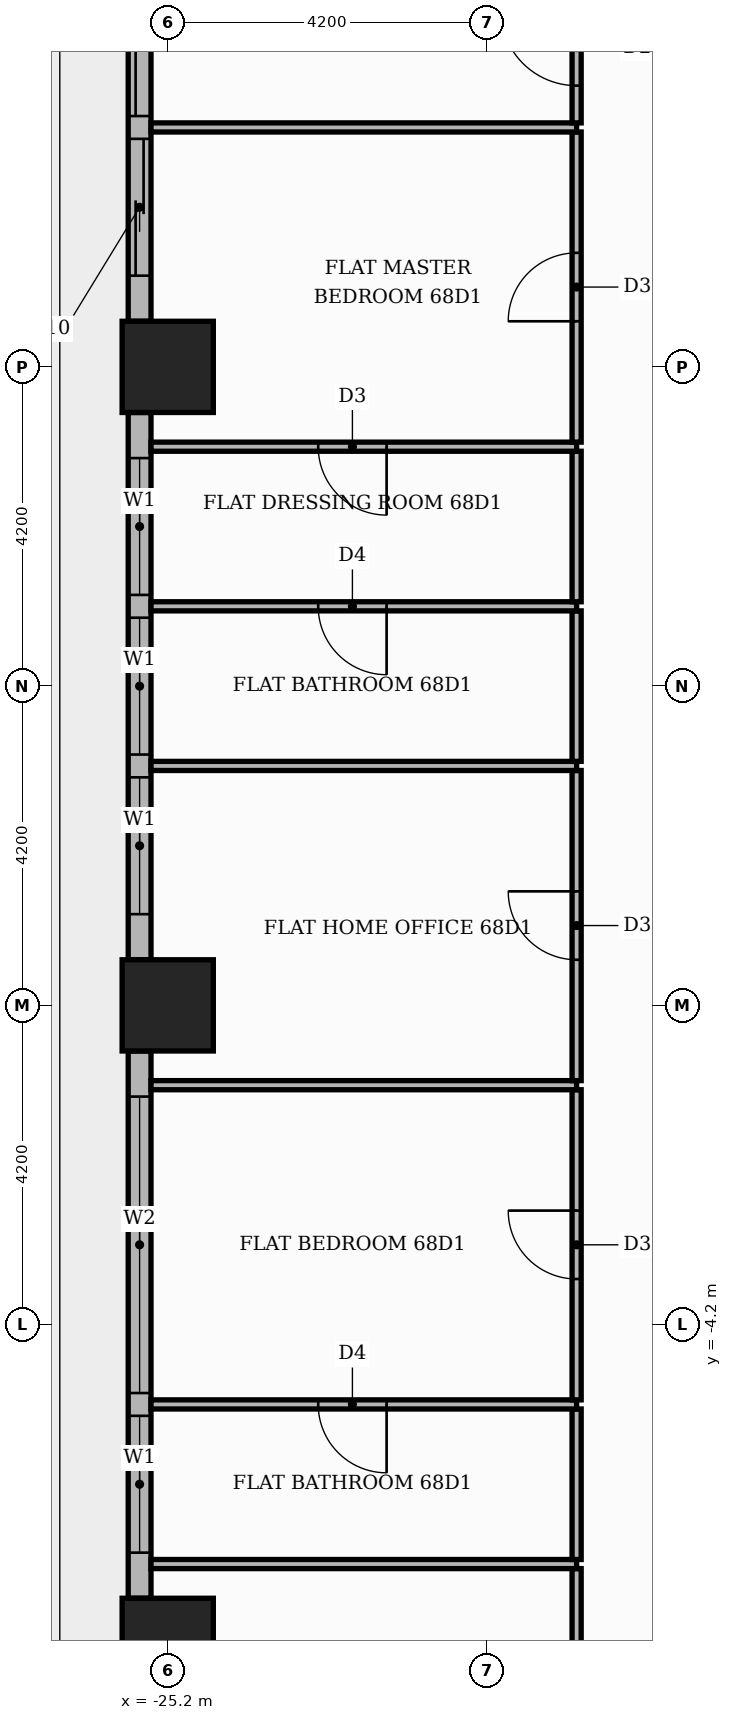
"""IFC4 building model, lengths in metres.
Left out: names, types, materials, properties, quantities, classifications, styles, units other than length and angle.
Written with IfcOpenShell. Run it as: python <this file> out.ifc"""

import sys

from ifc_helpers import new_model, si_unit, direction, frame, frame_2d, origin, origin_2d, place, context, subcontext, project, spatial, rectangle, extrude, element, fill, save


model = new_model("IFC4")
c1 = context("Model", 3, precision=1e-05, world=origin(), true_north=direction((0.0, 1.0)))
c2 = subcontext(c1, "Body", "Model", "MODEL_VIEW")
j1 = project(units=[si_unit("LENGTHUNIT", "METRE"), si_unit("PLANEANGLEUNIT", "RADIAN")], contexts=[c1])
p1 = place(None, origin())
s1 = spatial("IfcSite", under=j1, at=p1, CompositionType="ELEMENT")
p2 = place(p1, origin())
s2 = spatial("IfcBuilding", under=s1, at=p2, CompositionType="ELEMENT")
p3 = place(p2, frame((0.0, 0.0, 283.5)))
s3 = spatial("IfcBuildingStorey", under=s2, at=p3, CompositionType="ELEMENT", Elevation=283.5)
for number, where, z_axis, x_axis in (
    (1, (-25.2, 0.0, 0.0), (0.0, 0.0, 1.0), (1.0, 0.0, 0.0)),
    (2, (-25.2, -8.4, 0.0), (0.0, 0.0, 1.0), (1.0, 0.0, 0.0)),
    (3, (-25.2, 8.4, 0.0), (0.0, 0.0, 1.0), (1.0, 0.0, 0.0)),
):
    element("IfcColumn", number, at=place(p3, frame(where, z_axis=z_axis, x_axis=x_axis)), inside=s3, PredefinedType="COLUMN", context=c2, shape_type="SweptSolid", body=[
        extrude(rectangle(XDim=1.2, YDim=1.2, at=origin_2d()), origin(), (0.0, 0.0, 1.0), 3.9),
    ])
p4 = place(p3, frame((-25.57, 16.2, 0.0), z_axis=(0.0, 0.0, 1.0), x_axis=(0.0, -1.0, 0.0)))
e4 = element("IfcWall", 4, at=p4, inside=s3, PredefinedType="STANDARD", context=c2, shape_type="SweptSolid", body=[
    extrude(rectangle(XDim=7.2, YDim=0.3, at=frame_2d((3.6, 0.0))), origin(), (0.0, 0.0, 1.0), 3.4),
])
p5 = place(p4, frame((0.6, 0.0, 0.0)))
e5 = element("IfcOpeningElement", 5, at=p5, cuts=e4, PredefinedType="OPENING", context=c2, shape_type="SweptSolid", body=[
    extrude(rectangle(XDim=3.9, YDim=2.4, at=frame_2d((1.95, 1.2))), frame((0.0, 0.16, 0.0), z_axis=(0.0, -1.0, 0.0), x_axis=(1.0, 0.0, 0.0)), (0.0, 0.0, 1.0), 0.32),
])
p6 = place(p4, frame((4.8, 0.0, 0.0)))
e6 = element("IfcOpeningElement", 6, at=p6, cuts=e4, PredefinedType="OPENING", context=c2, shape_type="SweptSolid", body=[
    extrude(rectangle(XDim=1.8, YDim=2.4, at=frame_2d((0.9, 1.2))), frame((0.0, 0.16, 0.0), z_axis=(0.0, -1.0, 0.0), x_axis=(1.0, 0.0, 0.0)), (0.0, 0.0, 1.0), 0.32),
])
p7 = place(p3, frame((-25.57, 7.8, 0.0), z_axis=(0.0, 0.0, 1.0), x_axis=(0.0, -1.0, 0.0)))
e7 = element("IfcWall", 7, at=p7, inside=s3, PredefinedType="STANDARD", context=c2, shape_type="SweptSolid", body=[
    extrude(rectangle(XDim=7.2, YDim=0.3, at=frame_2d((3.6, 0.0))), origin(), (0.0, 0.0, 1.0), 3.4),
])
p8 = place(p7, frame((0.6, 0.0, 0.9)))
e8 = element("IfcOpeningElement", 8, at=p8, cuts=e7, PredefinedType="OPENING", context=c2, shape_type="SweptSolid", body=[
    extrude(rectangle(XDim=1.8, YDim=2.1, at=frame_2d((0.9, 1.05))), frame((0.0, 0.16, 0.0), z_axis=(0.0, -1.0, 0.0), x_axis=(1.0, 0.0, 0.0)), (0.0, 0.0, 1.0), 0.32),
])
p9 = place(p7, frame((2.7, 0.0, 0.9)))
e9 = element("IfcOpeningElement", 9, at=p9, cuts=e7, PredefinedType="OPENING", context=c2, shape_type="SweptSolid", body=[
    extrude(rectangle(XDim=1.8, YDim=2.1, at=frame_2d((0.9, 1.05))), frame((0.0, 0.16, 0.0), z_axis=(0.0, -1.0, 0.0), x_axis=(1.0, 0.0, 0.0)), (0.0, 0.0, 1.0), 0.32),
])
p10 = place(p7, frame((4.8, 0.0, 0.9)))
e10 = element("IfcOpeningElement", 10, at=p10, cuts=e7, PredefinedType="OPENING", context=c2, shape_type="SweptSolid", body=[
    extrude(rectangle(XDim=1.8, YDim=2.1, at=frame_2d((0.9, 1.05))), frame((0.0, 0.16, 0.0), z_axis=(0.0, -1.0, 0.0), x_axis=(1.0, 0.0, 0.0)), (0.0, 0.0, 1.0), 0.32),
])
p11 = place(p3, frame((-25.57, -0.6, 0.0), z_axis=(0.0, 0.0, 1.0), x_axis=(0.0, -1.0, 0.0)))
e11 = element("IfcWall", 11, at=p11, inside=s3, PredefinedType="STANDARD", context=c2, shape_type="SweptSolid", body=[
    extrude(rectangle(XDim=7.2, YDim=0.3, at=frame_2d((3.6, 0.0))), origin(), (0.0, 0.0, 1.0), 3.4),
])
p12 = place(p11, frame((0.6, 0.0, 0.9)))
e12 = element("IfcOpeningElement", 12, at=p12, cuts=e11, PredefinedType="OPENING", context=c2, shape_type="SweptSolid", body=[
    extrude(rectangle(XDim=3.9, YDim=2.1, at=frame_2d((1.95, 1.05))), frame((0.0, 0.16, 0.0), z_axis=(0.0, -1.0, 0.0), x_axis=(1.0, 0.0, 0.0)), (0.0, 0.0, 1.0), 0.32),
])
p13 = place(p11, frame((4.8, 0.0, 0.9)))
e13 = element("IfcOpeningElement", 13, at=p13, cuts=e11, PredefinedType="OPENING", context=c2, shape_type="SweptSolid", body=[
    extrude(rectangle(XDim=1.8, YDim=2.1, at=frame_2d((0.9, 1.05))), frame((0.0, 0.16, 0.0), z_axis=(0.0, -1.0, 0.0), x_axis=(1.0, 0.0, 0.0)), (0.0, 0.0, 1.0), 0.32),
])
p14 = place(p3, frame((-19.82, -11.49, 0.0), z_axis=(0.0, 0.0, 1.0), x_axis=(0.0, 1.0, 0.0)))
e14 = element("IfcWall", 14, at=p14, inside=s3, PredefinedType="PARTITIONING", context=c2, shape_type="SweptSolid", body=[
    extrude(rectangle(XDim=4.08, YDim=0.12, at=frame_2d((2.04, 0.0))), origin(), (0.0, 0.0, 1.0), 3.4),
])
p15 = place(p14, frame((1.59, 0.0, 0.0)))
e15 = element("IfcOpeningElement", 15, at=p15, cuts=e14, PredefinedType="OPENING", context=c2, shape_type="SweptSolid", body=[
    extrude(rectangle(XDim=0.9, YDim=2.1, at=frame_2d((0.45, 1.05))), frame((0.0, 0.07, 0.0), z_axis=(0.0, -1.0, 0.0), x_axis=(1.0, 0.0, 0.0)), (0.0, 0.0, 1.0), 0.14),
])
p16 = place(p3, frame((-25.42, -7.35, 0.0), z_axis=(0.0, 0.0, 1.0), x_axis=(1.0, 0.0, 0.0)))
e16 = element("IfcWall", 16, at=p16, inside=s3, PredefinedType="PARTITIONING", context=c2, shape_type="SweptSolid", body=[
    extrude(rectangle(XDim=5.6, YDim=0.12, at=frame_2d((2.8, 0.0))), origin(), (0.0, 0.0, 1.0), 3.4),
])
p17 = place(p3, frame((-19.82, -7.29, 0.0), z_axis=(0.0, 0.0, 1.0), x_axis=(0.0, 1.0, 0.0)))
e17 = element("IfcWall", 17, at=p17, inside=s3, PredefinedType="PARTITIONING", context=c2, shape_type="SweptSolid", body=[
    extrude(rectangle(XDim=1.98, YDim=0.12, at=frame_2d((0.99, 0.0))), origin(), (0.0, 0.0, 1.0), 3.4),
])
p18 = place(p3, frame((-25.42, -5.25, 0.0), z_axis=(0.0, 0.0, 1.0), x_axis=(1.0, 0.0, 0.0)))
e18 = element("IfcWall", 18, at=p18, inside=s3, PredefinedType="PARTITIONING", context=c2, shape_type="SweptSolid", body=[
    extrude(rectangle(XDim=5.6, YDim=0.12, at=frame_2d((2.8, 0.0))), origin(), (0.0, 0.0, 1.0), 3.4),
])
p19 = place(p18, frame((2.2, 0.0, 0.0)))
e19 = element("IfcOpeningElement", 19, at=p19, cuts=e18, PredefinedType="OPENING", context=c2, shape_type="SweptSolid", body=[
    extrude(rectangle(XDim=0.9, YDim=2.1, at=frame_2d((0.45, 1.05))), frame((0.0, 0.07, 0.0), z_axis=(0.0, -1.0, 0.0), x_axis=(1.0, 0.0, 0.0)), (0.0, 0.0, 1.0), 0.14),
])
p20 = place(p3, frame((-19.82, -5.19, 0.0), z_axis=(0.0, 0.0, 1.0), x_axis=(0.0, 1.0, 0.0)))
e20 = element("IfcWall", 20, at=p20, inside=s3, PredefinedType="PARTITIONING", context=c2, shape_type="SweptSolid", body=[
    extrude(rectangle(XDim=4.08, YDim=0.12, at=frame_2d((2.04, 0.0))), origin(), (0.0, 0.0, 1.0), 3.4),
])
p21 = place(p20, frame((1.59, 0.0, 0.0)))
e21 = element("IfcOpeningElement", 21, at=p21, cuts=e20, PredefinedType="OPENING", context=c2, shape_type="SweptSolid", body=[
    extrude(rectangle(XDim=0.9, YDim=2.1, at=frame_2d((0.45, 1.05))), frame((0.0, 0.07, 0.0), z_axis=(0.0, -1.0, 0.0), x_axis=(1.0, 0.0, 0.0)), (0.0, 0.0, 1.0), 0.14),
])
p22 = place(p3, frame((-25.42, -1.05, 0.0), z_axis=(0.0, 0.0, 1.0), x_axis=(1.0, 0.0, 0.0)))
e22 = element("IfcWall", 22, at=p22, inside=s3, PredefinedType="PARTITIONING", context=c2, shape_type="SweptSolid", body=[
    extrude(rectangle(XDim=5.6, YDim=0.12, at=frame_2d((2.8, 0.0))), origin(), (0.0, 0.0, 1.0), 3.4),
])
p23 = place(p3, frame((-19.82, -0.99, 0.0), z_axis=(0.0, 0.0, 1.0), x_axis=(0.0, 1.0, 0.0)))
e23 = element("IfcWall", 23, at=p23, inside=s3, PredefinedType="PARTITIONING", context=c2, shape_type="SweptSolid", body=[
    extrude(rectangle(XDim=4.08, YDim=0.12, at=frame_2d((2.04, 0.0))), origin(), (0.0, 0.0, 1.0), 3.4),
])
p24 = place(p23, frame((1.59, 0.0, 0.0)))
e24 = element("IfcOpeningElement", 24, at=p24, cuts=e23, PredefinedType="OPENING", context=c2, shape_type="SweptSolid", body=[
    extrude(rectangle(XDim=0.9, YDim=2.1, at=frame_2d((0.45, 1.05))), frame((0.0, 0.07, 0.0), z_axis=(0.0, -1.0, 0.0), x_axis=(1.0, 0.0, 0.0)), (0.0, 0.0, 1.0), 0.14),
])
p25 = place(p3, frame((-25.42, 3.15, 0.0), z_axis=(0.0, 0.0, 1.0), x_axis=(1.0, 0.0, 0.0)))
e25 = element("IfcWall", 25, at=p25, inside=s3, PredefinedType="PARTITIONING", context=c2, shape_type="SweptSolid", body=[
    extrude(rectangle(XDim=5.6, YDim=0.12, at=frame_2d((2.8, 0.0))), origin(), (0.0, 0.0, 1.0), 3.4),
])
p26 = place(p3, frame((-19.82, 3.21, 0.0), z_axis=(0.0, 0.0, 1.0), x_axis=(0.0, 1.0, 0.0)))
e26 = element("IfcWall", 26, at=p26, inside=s3, PredefinedType="PARTITIONING", context=c2, shape_type="SweptSolid", body=[
    extrude(rectangle(XDim=1.98, YDim=0.12, at=frame_2d((0.99, 0.0))), origin(), (0.0, 0.0, 1.0), 3.4),
])
p27 = place(p3, frame((-25.42, 5.25, 0.0), z_axis=(0.0, 0.0, 1.0), x_axis=(1.0, 0.0, 0.0)))
e27 = element("IfcWall", 27, at=p27, inside=s3, PredefinedType="PARTITIONING", context=c2, shape_type="SweptSolid", body=[
    extrude(rectangle(XDim=5.6, YDim=0.12, at=frame_2d((2.8, 0.0))), origin(), (0.0, 0.0, 1.0), 3.4),
])
p28 = place(p27, frame((2.2, 0.0, 0.0)))
e28 = element("IfcOpeningElement", 28, at=p28, cuts=e27, PredefinedType="OPENING", context=c2, shape_type="SweptSolid", body=[
    extrude(rectangle(XDim=0.9, YDim=2.1, at=frame_2d((0.45, 1.05))), frame((0.0, 0.07, 0.0), z_axis=(0.0, -1.0, 0.0), x_axis=(1.0, 0.0, 0.0)), (0.0, 0.0, 1.0), 0.14),
])
p29 = place(p3, frame((-19.82, 5.31, 0.0), z_axis=(0.0, 0.0, 1.0), x_axis=(0.0, 1.0, 0.0)))
e29 = element("IfcWall", 29, at=p29, inside=s3, PredefinedType="PARTITIONING", context=c2, shape_type="SweptSolid", body=[
    extrude(rectangle(XDim=1.98, YDim=0.12, at=frame_2d((0.99, 0.0))), origin(), (0.0, 0.0, 1.0), 3.4),
])
p30 = place(p3, frame((-25.42, 7.35, 0.0), z_axis=(0.0, 0.0, 1.0), x_axis=(1.0, 0.0, 0.0)))
e30 = element("IfcWall", 30, at=p30, inside=s3, PredefinedType="PARTITIONING", context=c2, shape_type="SweptSolid", body=[
    extrude(rectangle(XDim=5.6, YDim=0.12, at=frame_2d((2.8, 0.0))), origin(), (0.0, 0.0, 1.0), 3.4),
])
p31 = place(p30, frame((2.2, 0.0, 0.0)))
e31 = element("IfcOpeningElement", 31, at=p31, cuts=e30, PredefinedType="OPENING", context=c2, shape_type="SweptSolid", body=[
    extrude(rectangle(XDim=0.9, YDim=2.1, at=frame_2d((0.45, 1.05))), frame((0.0, 0.07, 0.0), z_axis=(0.0, -1.0, 0.0), x_axis=(1.0, 0.0, 0.0)), (0.0, 0.0, 1.0), 0.14),
])
p32 = place(p3, frame((-19.82, 7.41, 0.0), z_axis=(0.0, 0.0, 1.0), x_axis=(0.0, 1.0, 0.0)))
e32 = element("IfcWall", 32, at=p32, inside=s3, PredefinedType="PARTITIONING", context=c2, shape_type="SweptSolid", body=[
    extrude(rectangle(XDim=4.08, YDim=0.12, at=frame_2d((2.04, 0.0))), origin(), (0.0, 0.0, 1.0), 3.4),
])
p33 = place(p32, frame((1.59, 0.0, 0.0)))
e33 = element("IfcOpeningElement", 33, at=p33, cuts=e32, PredefinedType="OPENING", context=c2, shape_type="SweptSolid", body=[
    extrude(rectangle(XDim=0.9, YDim=2.1, at=frame_2d((0.45, 1.05))), frame((0.0, 0.07, 0.0), z_axis=(0.0, -1.0, 0.0), x_axis=(1.0, 0.0, 0.0)), (0.0, 0.0, 1.0), 0.14),
])
p34 = place(p3, frame((-25.42, 11.55, 0.0), z_axis=(0.0, 0.0, 1.0), x_axis=(1.0, 0.0, 0.0)))
e34 = element("IfcWall", 34, at=p34, inside=s3, PredefinedType="PARTITIONING", context=c2, shape_type="SweptSolid", body=[
    extrude(rectangle(XDim=5.6, YDim=0.12, at=frame_2d((2.8, 0.0))), origin(), (0.0, 0.0, 1.0), 3.4),
])
p35 = place(p3, frame((-19.82, 11.61, 0.0), z_axis=(0.0, 0.0, 1.0), x_axis=(0.0, 1.0, 0.0)))
e35 = element("IfcWall", 35, at=p35, inside=s3, PredefinedType="PARTITIONING", context=c2, shape_type="SweptSolid", body=[
    extrude(rectangle(XDim=1.98, YDim=0.12, at=frame_2d((0.99, 0.0))), origin(), (0.0, 0.0, 1.0), 3.4),
])
p36 = place(p35, frame((0.49, 0.0, 0.0)))
e36 = element("IfcOpeningElement", 36, at=p36, cuts=e35, PredefinedType="OPENING", context=c2, shape_type="SweptSolid", body=[
    extrude(rectangle(XDim=1.0, YDim=2.1, at=frame_2d((0.5, 1.05))), frame((0.0, 0.07, 0.0), z_axis=(0.0, -1.0, 0.0), x_axis=(1.0, 0.0, 0.0)), (0.0, 0.0, 1.0), 0.14),
])
p37 = place(p5, origin())
e37 = element("IfcDoor", 37, at=p37, inside=s3, OperationType="SLIDING_TO_LEFT", PredefinedType="DOOR", context=c2, shape_type="SweptSolid", body=[
    extrude(rectangle(XDim=3.9, YDim=2.4, at=frame_2d((1.95, 1.2))), frame((0.0, 0.025, 0.0), z_axis=(0.0, -1.0, 0.0), x_axis=(1.0, 0.0, 0.0)), (0.0, 0.0, 1.0), 0.05),
])
fill(e5, e37)
p38 = place(p6, origin())
e38 = element("IfcDoor", 38, at=p38, inside=s3, OperationType="SLIDING_TO_RIGHT", PredefinedType="DOOR", context=c2, shape_type="SweptSolid", body=[
    extrude(rectangle(XDim=1.8, YDim=2.4, at=frame_2d((0.9, 1.2))), frame((0.0, 0.025, 0.0), z_axis=(0.0, -1.0, 0.0), x_axis=(1.0, 0.0, 0.0)), (0.0, 0.0, 1.0), 0.05),
])
fill(e6, e38)
p39 = place(p8, origin())
e39 = element("IfcWindow", 39, at=p39, inside=s3, PartitioningType="SINGLE_PANEL", PredefinedType="WINDOW", context=c2, shape_type="SweptSolid", body=[
    extrude(rectangle(XDim=1.8, YDim=2.1, at=frame_2d((0.9, 1.05))), frame((0.0, 0.03, 0.0), z_axis=(0.0, -1.0, 0.0), x_axis=(1.0, 0.0, 0.0)), (0.0, 0.0, 1.0), 0.06),
])
fill(e8, e39)
p40 = place(p9, origin())
e40 = element("IfcWindow", 40, at=p40, inside=s3, PartitioningType="SINGLE_PANEL", PredefinedType="WINDOW", context=c2, shape_type="SweptSolid", body=[
    extrude(rectangle(XDim=1.8, YDim=2.1, at=frame_2d((0.9, 1.05))), frame((0.0, 0.03, 0.0), z_axis=(0.0, -1.0, 0.0), x_axis=(1.0, 0.0, 0.0)), (0.0, 0.0, 1.0), 0.06),
])
fill(e9, e40)
p41 = place(p10, origin())
e41 = element("IfcWindow", 41, at=p41, inside=s3, PartitioningType="SINGLE_PANEL", PredefinedType="WINDOW", context=c2, shape_type="SweptSolid", body=[
    extrude(rectangle(XDim=1.8, YDim=2.1, at=frame_2d((0.9, 1.05))), frame((0.0, 0.03, 0.0), z_axis=(0.0, -1.0, 0.0), x_axis=(1.0, 0.0, 0.0)), (0.0, 0.0, 1.0), 0.06),
])
fill(e10, e41)
p42 = place(p12, origin())
e42 = element("IfcWindow", 42, at=p42, inside=s3, PartitioningType="SINGLE_PANEL", PredefinedType="WINDOW", context=c2, shape_type="SweptSolid", body=[
    extrude(rectangle(XDim=3.9, YDim=2.1, at=frame_2d((1.95, 1.05))), frame((0.0, 0.03, 0.0), z_axis=(0.0, -1.0, 0.0), x_axis=(1.0, 0.0, 0.0)), (0.0, 0.0, 1.0), 0.06),
])
fill(e12, e42)
p43 = place(p13, origin())
e43 = element("IfcWindow", 43, at=p43, inside=s3, PartitioningType="SINGLE_PANEL", PredefinedType="WINDOW", context=c2, shape_type="SweptSolid", body=[
    extrude(rectangle(XDim=1.8, YDim=2.1, at=frame_2d((0.9, 1.05))), frame((0.0, 0.03, 0.0), z_axis=(0.0, -1.0, 0.0), x_axis=(1.0, 0.0, 0.0)), (0.0, 0.0, 1.0), 0.06),
])
fill(e13, e43)
p44 = place(p36, origin())
e44 = element("IfcDoor", 44, at=p44, inside=s3, OperationType="SINGLE_SWING_RIGHT", PredefinedType="DOOR", context=c2, shape_type="SweptSolid", body=[
    extrude(rectangle(XDim=1.0, YDim=2.1, at=frame_2d((0.5, 1.05))), frame((0.0, 0.025, 0.0), z_axis=(0.0, -1.0, 0.0), x_axis=(1.0, 0.0, 0.0)), (0.0, 0.0, 1.0), 0.05),
])
fill(e36, e44)
p45 = place(p33, origin())
e45 = element("IfcDoor", 45, at=p45, inside=s3, OperationType="SINGLE_SWING_LEFT", PredefinedType="DOOR", context=c2, shape_type="SweptSolid", body=[
    extrude(rectangle(XDim=0.9, YDim=2.1, at=frame_2d((0.45, 1.05))), frame((0.0, 0.025, 0.0), z_axis=(0.0, -1.0, 0.0), x_axis=(1.0, 0.0, 0.0)), (0.0, 0.0, 1.0), 0.05),
])
fill(e33, e45)
p46 = place(p31, frame((0.9, 0.0, 0.0), z_axis=(0.0, 0.0, 1.0), x_axis=(-1.0, 0.0, 0.0)))
e46 = element("IfcDoor", 46, at=p46, inside=s3, OperationType="SINGLE_SWING_RIGHT", PredefinedType="DOOR", context=c2, shape_type="SweptSolid", body=[
    extrude(rectangle(XDim=0.9, YDim=2.1, at=frame_2d((0.45, 1.05))), frame((0.0, 0.025, 0.0), z_axis=(0.0, -1.0, 0.0), x_axis=(1.0, 0.0, 0.0)), (0.0, 0.0, 1.0), 0.05),
])
fill(e31, e46)
p47 = place(p28, frame((0.9, 0.0, 0.0), z_axis=(0.0, 0.0, 1.0), x_axis=(-1.0, 0.0, 0.0)))
e47 = element("IfcDoor", 47, at=p47, inside=s3, OperationType="SINGLE_SWING_RIGHT", PredefinedType="DOOR", context=c2, shape_type="SweptSolid", body=[
    extrude(rectangle(XDim=0.9, YDim=2.1, at=frame_2d((0.45, 1.05))), frame((0.0, 0.025, 0.0), z_axis=(0.0, -1.0, 0.0), x_axis=(1.0, 0.0, 0.0)), (0.0, 0.0, 1.0), 0.05),
])
fill(e28, e47)
p48 = place(p24, origin())
e48 = element("IfcDoor", 48, at=p48, inside=s3, OperationType="SINGLE_SWING_RIGHT", PredefinedType="DOOR", context=c2, shape_type="SweptSolid", body=[
    extrude(rectangle(XDim=0.9, YDim=2.1, at=frame_2d((0.45, 1.05))), frame((0.0, 0.025, 0.0), z_axis=(0.0, -1.0, 0.0), x_axis=(1.0, 0.0, 0.0)), (0.0, 0.0, 1.0), 0.05),
])
fill(e24, e48)
p49 = place(p21, origin())
e49 = element("IfcDoor", 49, at=p49, inside=s3, OperationType="SINGLE_SWING_RIGHT", PredefinedType="DOOR", context=c2, shape_type="SweptSolid", body=[
    extrude(rectangle(XDim=0.9, YDim=2.1, at=frame_2d((0.45, 1.05))), frame((0.0, 0.025, 0.0), z_axis=(0.0, -1.0, 0.0), x_axis=(1.0, 0.0, 0.0)), (0.0, 0.0, 1.0), 0.05),
])
fill(e21, e49)
p50 = place(p19, frame((0.9, 0.0, 0.0), z_axis=(0.0, 0.0, 1.0), x_axis=(-1.0, 0.0, 0.0)))
e50 = element("IfcDoor", 50, at=p50, inside=s3, OperationType="SINGLE_SWING_RIGHT", PredefinedType="DOOR", context=c2, shape_type="SweptSolid", body=[
    extrude(rectangle(XDim=0.9, YDim=2.1, at=frame_2d((0.45, 1.05))), frame((0.0, 0.025, 0.0), z_axis=(0.0, -1.0, 0.0), x_axis=(1.0, 0.0, 0.0)), (0.0, 0.0, 1.0), 0.05),
])
fill(e19, e50)
save(model, sys.argv[1])
